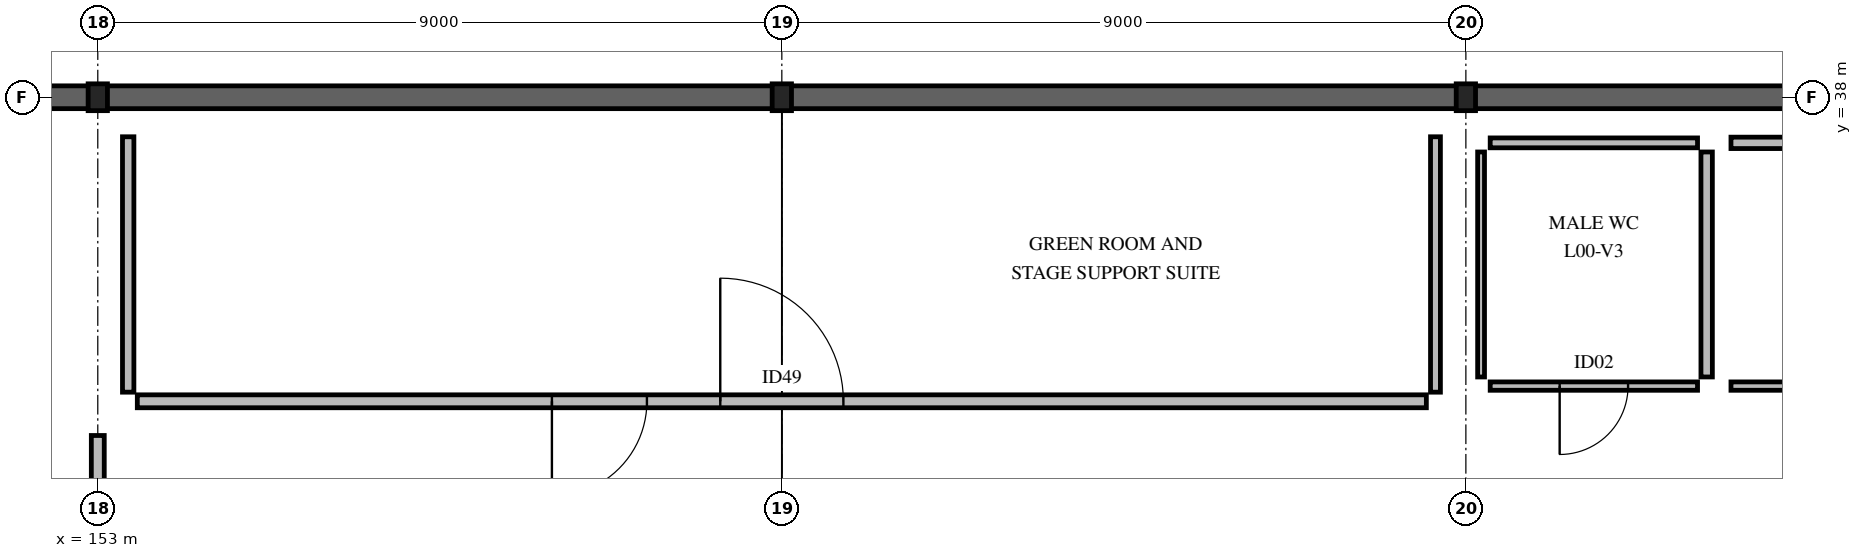
"""IFC4 building model, lengths in metres.
Left out: names, types, materials, properties, quantities, classifications, styles, units other than length and angle.
Written with IfcOpenShell. Run it as: python <this file> out.ifc"""

import sys

from ifc_helpers import new_model, si_unit, direction, frame, frame_2d, origin, origin_2d, place, context, subcontext, project, spatial, rectangle, i_section, extrude, element, fill, save


model = new_model("IFC4")
c1 = context("Model", 3, precision=1e-05, world=origin(), true_north=direction((0.0, 1.0)))
c2 = subcontext(c1, "Body", "Model", "MODEL_VIEW")
j1 = project(units=[si_unit("LENGTHUNIT", "METRE"), si_unit("PLANEANGLEUNIT", "RADIAN")], contexts=[c1])
p1 = place(None, origin())
s1 = spatial("IfcSite", under=j1, at=p1, CompositionType="ELEMENT")
p2 = place(p1, origin())
s2 = spatial("IfcBuilding", under=s1, at=p2, CompositionType="ELEMENT")
p3 = place(p2, origin())
s3 = spatial("IfcBuildingStorey", under=s2, at=p3, CompositionType="ELEMENT", Elevation=0.0)
for number, where, z_axis, x_axis in (
    (1, (153.0, 38.0, 0.0), (0.0, 0.0, 1.0), (1.0, 0.0, 0.0)),
    (2, (162.0, 38.0, 0.0), (0.0, 0.0, 1.0), (1.0, 0.0, 0.0)),
    (3, (171.0, 38.0, 0.0), (0.0, 0.0, 1.0), (1.0, 0.0, 0.0)),
):
    element("IfcColumn", number, at=place(p3, frame(where, z_axis=z_axis, x_axis=x_axis)), inside=s3, PredefinedType="COLUMN", context=c2, shape_type="SweptSolid", body=[
        extrude(i_section(OverallWidth=0.254, OverallDepth=0.353, WebThickness=0.01, FlangeThickness=0.016, FilletRadius=0.015, at=origin_2d()), origin(), (0.0, 0.0, 1.0), 5.04),
    ])
p4 = place(p3, frame((143.79, 38.0, 0.0), z_axis=(0.0, 0.0, 1.0), x_axis=(1.0, 0.0, 0.0)))
e4 = element("IfcWall", 4, at=p4, inside=s3, PredefinedType="SOLIDWALL", context=c2, shape_type="SweptSolid", body=[
    extrude(rectangle(XDim=9.21, YDim=0.3, at=frame_2d((4.605, 0.0))), origin(), (0.0, 0.0, 1.0), 5.04),
])
p5 = place(p4, frame((3.91, 0.0, 0.0)))
e5 = element("IfcOpeningElement", 5, at=p5, cuts=e4, PredefinedType="OPENING", context=c2, shape_type="SweptSolid", body=[
    extrude(rectangle(XDim=1.6, YDim=2.2, at=frame_2d((0.8, 1.1))), frame((0.0, 0.16, 0.0), z_axis=(0.0, -1.0, 0.0), x_axis=(1.0, 0.0, 0.0)), (0.0, 0.0, 1.0), 0.32),
])
for number, where, z_axis, x_axis in (
    (6, (153.0, 38.0, 0.0), (0.0, 0.0, 1.0), (1.0, 0.0, 0.0)),
    (7, (162.0, 38.0, 0.0), (0.0, 0.0, 1.0), (1.0, 0.0, 0.0)),
    (8, (171.0, 38.0, 0.0), (0.0, 0.0, 1.0), (1.0, 0.0, 0.0)),
):
    element("IfcWall", number, at=place(p3, frame(where, z_axis=z_axis, x_axis=x_axis)), inside=s3, PredefinedType="SOLIDWALL", context=c2, shape_type="SweptSolid", body=[
        extrude(rectangle(XDim=9.0, YDim=0.3, at=frame_2d((4.5, 0.0))), origin(), (0.0, 0.0, 1.0), 5.04),
    ])
p6 = place(p3, frame((153.0, 30.85, 0.0), z_axis=(0.0, 0.0, 1.0), x_axis=(0.0, 1.0, 0.0)))
e9 = element("IfcWall", 9, at=p6, inside=s3, PredefinedType="PARTITIONING", context=c2, shape_type="SweptSolid", body=[
    extrude(rectangle(XDim=2.7, YDim=0.17, at=frame_2d((1.35, 0.0))), origin(), (0.0, 0.0, 1.0), 4.411),
])
p7 = place(p6, frame((0.8, 0.0, 0.0)))
e10 = element("IfcOpeningElement", 10, at=p7, cuts=e9, PredefinedType="OPENING", context=c2, shape_type="SweptSolid", body=[
    extrude(rectangle(XDim=1.0, YDim=2.15, at=frame_2d((0.5, 1.075))), frame((0.0, 0.095, 0.0), z_axis=(0.0, -1.0, 0.0), x_axis=(1.0, 0.0, 0.0)), (0.0, 0.0, 1.0), 0.19),
])
p8 = place(p3, frame((153.52, 34.0, 0.0), z_axis=(0.0, 0.0, 1.0), x_axis=(1.0, 0.0, 0.0)))
e11 = element("IfcWall", 11, at=p8, inside=s3, PredefinedType="PARTITIONING", context=c2, shape_type="SweptSolid", body=[
    extrude(rectangle(XDim=16.96, YDim=0.17, at=frame_2d((8.48, 0.0))), origin(), (0.0, 0.0, 1.0), 4.76),
])
p9 = place(p8, frame((7.67, 0.0, 0.0)))
e12 = element("IfcOpeningElement", 12, at=p9, cuts=e11, PredefinedType="OPENING", context=c2, shape_type="SweptSolid", body=[
    extrude(rectangle(XDim=1.62, YDim=2.2, at=frame_2d((0.81, 1.1))), frame((0.0, 0.095, 0.0), z_axis=(0.0, -1.0, 0.0), x_axis=(1.0, 0.0, 0.0)), (0.0, 0.0, 1.0), 0.19),
])
p10 = place(p8, frame((5.455, 0.0, 0.0)))
e13 = element("IfcOpeningElement", 13, at=p10, cuts=e11, PredefinedType="OPENING", context=c2, shape_type="SweptSolid", body=[
    extrude(rectangle(XDim=1.25, YDim=2.18, at=frame_2d((0.625, 1.09))), frame((0.0, 0.095, 0.0), z_axis=(0.0, -1.0, 0.0), x_axis=(1.0, 0.0, 0.0)), (0.0, 0.0, 1.0), 0.19),
])
p11 = place(p3, frame((153.4, 34.12, 0.0), z_axis=(0.0, 0.0, 1.0), x_axis=(0.0, 1.0, 0.0)))
e14 = element("IfcWall", 14, at=p11, inside=s3, PredefinedType="PARTITIONING", context=c2, shape_type="SweptSolid", body=[
    extrude(rectangle(XDim=3.36, YDim=0.15, at=frame_2d((1.68, 0.0))), origin(), (0.0, 0.0, 1.0), 4.76),
])
p12 = place(p3, frame((170.6, 34.12, 0.0), z_axis=(0.0, 0.0, 1.0), x_axis=(0.0, 1.0, 0.0)))
e15 = element("IfcWall", 15, at=p12, inside=s3, PredefinedType="PARTITIONING", context=c2, shape_type="SweptSolid", body=[
    extrude(rectangle(XDim=3.36, YDim=0.13, at=frame_2d((1.68, 0.0))), origin(), (0.0, 0.0, 1.0), 4.76),
])
p13 = place(p3, frame((171.32, 34.2, 0.0), z_axis=(0.0, 0.0, 1.0), x_axis=(1.0, 0.0, 0.0)))
e16 = element("IfcWall", 16, at=p13, inside=s3, PredefinedType="PARTITIONING", context=c2, shape_type="SweptSolid", body=[
    extrude(rectangle(XDim=2.728, YDim=0.11, at=frame_2d((1.364, 0.0))), origin(), (0.0, 0.0, 1.0), 4.76),
])
p14 = place(p13, frame((0.914, 0.0, 0.0)))
e17 = element("IfcOpeningElement", 17, at=p14, cuts=e16, PredefinedType="OPENING", context=c2, shape_type="SweptSolid", body=[
    extrude(rectangle(XDim=0.9, YDim=2.06, at=frame_2d((0.45, 1.03))), frame((0.0, 0.065, 0.0), z_axis=(0.0, -1.0, 0.0), x_axis=(1.0, 0.0, 0.0)), (0.0, 0.0, 1.0), 0.13),
])
p15 = place(p3, frame((171.2, 34.32, 0.0), z_axis=(0.0, 0.0, 1.0), x_axis=(0.0, 1.0, 0.0)))
e18 = element("IfcWall", 18, at=p15, inside=s3, PredefinedType="PARTITIONING", context=c2, shape_type="SweptSolid", body=[
    extrude(rectangle(XDim=2.96, YDim=0.09, at=frame_2d((1.48, 0.0))), origin(), (0.0, 0.0, 1.0), 4.76),
])
p16 = place(p3, frame((174.168, 34.32, 0.0), z_axis=(0.0, 0.0, 1.0), x_axis=(0.0, 1.0, 0.0)))
e19 = element("IfcWall", 19, at=p16, inside=s3, PredefinedType="PARTITIONING", context=c2, shape_type="SweptSolid", body=[
    extrude(rectangle(XDim=2.96, YDim=0.15, at=frame_2d((1.48, 0.0))), origin(), (0.0, 0.0, 1.0), 4.76),
])
p17 = place(p3, frame((171.32, 37.4, 0.0), z_axis=(0.0, 0.0, 1.0), x_axis=(1.0, 0.0, 0.0)))
e20 = element("IfcWall", 20, at=p17, inside=s3, PredefinedType="PARTITIONING", context=c2, shape_type="SweptSolid", body=[
    extrude(rectangle(XDim=2.728, YDim=0.13, at=frame_2d((1.364, 0.0))), origin(), (0.0, 0.0, 1.0), 4.76),
])
p18 = place(p3, frame((174.488, 34.2, 0.0), z_axis=(0.0, 0.0, 1.0), x_axis=(1.0, 0.0, 0.0)))
e21 = element("IfcWall", 21, at=p18, inside=s3, PredefinedType="PARTITIONING", context=c2, shape_type="SweptSolid", body=[
    extrude(rectangle(XDim=2.828, YDim=0.11, at=frame_2d((1.414, 0.0))), origin(), (0.0, 0.0, 1.0), 4.76),
])
p19 = place(p18, frame((0.944, 0.0, 0.0)))
e22 = element("IfcOpeningElement", 22, at=p19, cuts=e21, PredefinedType="OPENING", context=c2, shape_type="SweptSolid", body=[
    extrude(rectangle(XDim=0.94, YDim=2.06, at=frame_2d((0.47, 1.03))), frame((0.0, 0.065, 0.0), z_axis=(0.0, -1.0, 0.0), x_axis=(1.0, 0.0, 0.0)), (0.0, 0.0, 1.0), 0.13),
])
p20 = place(p3, frame((174.488, 37.4, 0.0), z_axis=(0.0, 0.0, 1.0), x_axis=(1.0, 0.0, 0.0)))
e23 = element("IfcWall", 23, at=p20, inside=s3, PredefinedType="PARTITIONING", context=c2, shape_type="SweptSolid", body=[
    extrude(rectangle(XDim=2.828, YDim=0.15, at=frame_2d((1.414, 0.0))), origin(), (0.0, 0.0, 1.0), 4.76),
])
p21 = place(p9, origin())
e24 = element("IfcDoor", 24, at=p21, inside=s3, OperationType="SINGLE_SWING_LEFT", PredefinedType="DOOR", context=c2, shape_type="SweptSolid", body=[
    extrude(rectangle(XDim=1.62, YDim=2.2, at=frame_2d((0.81, 1.1))), frame((0.0, 0.025, 0.0), z_axis=(0.0, -1.0, 0.0), x_axis=(1.0, 0.0, 0.0)), (0.0, 0.0, 1.0), 0.05),
])
fill(e12, e24)
p22 = place(p14, origin())
e25 = element("IfcDoor", 25, at=p22, inside=s3, OperationType="SINGLE_SWING_RIGHT", PredefinedType="DOOR", context=c2, shape_type="SweptSolid", body=[
    extrude(rectangle(XDim=0.9, YDim=2.06, at=frame_2d((0.45, 1.03))), frame((0.0, 0.025, 0.0), z_axis=(0.0, -1.0, 0.0), x_axis=(1.0, 0.0, 0.0)), (0.0, 0.0, 1.0), 0.05),
])
fill(e17, e25)
p23 = place(p10, origin())
e26 = element("IfcDoor", 26, at=p23, inside=s3, OperationType="SINGLE_SWING_RIGHT", PredefinedType="DOOR", context=c2, shape_type="SweptSolid", body=[
    extrude(rectangle(XDim=1.25, YDim=2.18, at=frame_2d((0.625, 1.09))), frame((0.0, 0.025, 0.0), z_axis=(0.0, -1.0, 0.0), x_axis=(1.0, 0.0, 0.0)), (0.0, 0.0, 1.0), 0.05),
])
fill(e13, e26)
save(model, sys.argv[1])
